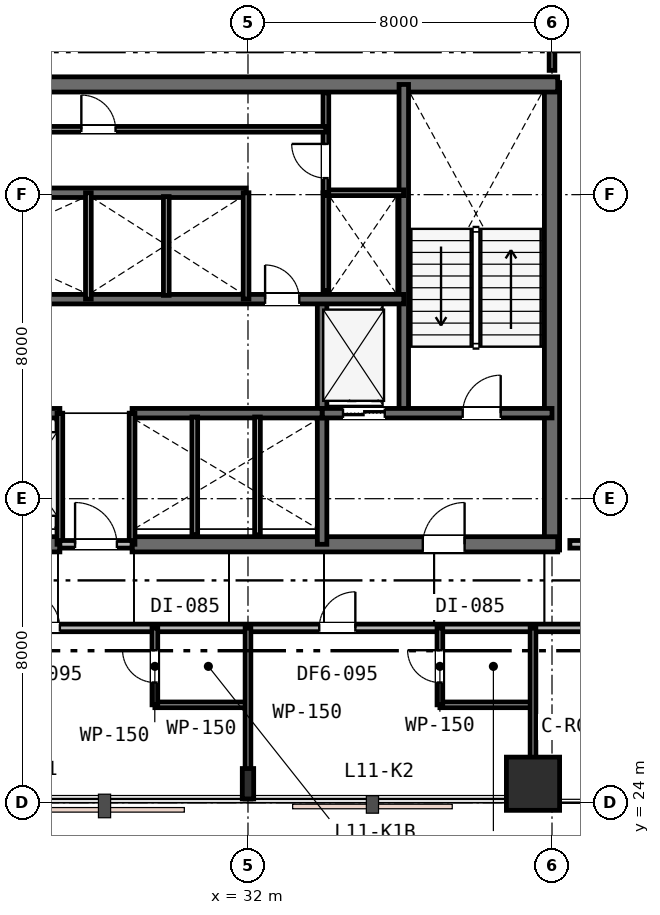
"""IFC4 building model, lengths in metres.
Left out: names, types, materials, properties, quantities, classifications, styles, units other than length and angle.
Written with IfcOpenShell. Run it as: python <this file> out.ifc"""

import sys

from ifc_helpers import new_model, si_unit, direction, frame, frame_2d, origin, origin_2d, place, context, subcontext, project, spatial, rectangle, i_section, extrude, element, fill, save


model = new_model("IFC4")
c1 = context("Model", 3, precision=1e-05, world=origin(), true_north=direction((0.0, 1.0)))
c2 = subcontext(c1, "Body", "Model", "MODEL_VIEW")
j1 = project(units=[si_unit("LENGTHUNIT", "METRE"), si_unit("PLANEANGLEUNIT", "RADIAN")], contexts=[c1])
p1 = place(None, origin())
s1 = spatial("IfcSite", under=j1, at=p1, CompositionType="ELEMENT")
p2 = place(p1, origin())
s2 = spatial("IfcBuilding", under=s1, at=p2, CompositionType="ELEMENT")
p3 = place(p2, frame((0.0, 0.0, 47.4)))
s3 = spatial("IfcBuildingStorey", under=s2, at=p3, CompositionType="ELEMENT", Elevation=47.4)
p4 = place(p3, frame((40.0, 30.65, 0.0), z_axis=(0.0, 0.0, 1.0), x_axis=(0.0, 1.0, 0.0)))
e1 = element("IfcWall", 1, at=p4, inside=s3, PredefinedType="SHEAR", context=c2, shape_type="SweptSolid", body=[
    extrude(rectangle(XDim=12.3, YDim=0.4, at=frame_2d((6.15, 0.0))), origin(), (0.0, 0.0, 1.0), 3.6),
])
p5 = place(p3, frame((15.85, 42.9, 0.0), z_axis=(0.0, 0.0, 1.0), x_axis=(1.0, 0.0, 0.0)))
e2 = element("IfcWall", 2, at=p5, inside=s3, PredefinedType="SHEAR", context=c2, shape_type="SweptSolid", body=[
    extrude(rectangle(XDim=24.3, YDim=0.4, at=frame_2d((12.15, 0.0))), origin(), (0.0, 0.0, 1.0), 3.6),
])
p6 = place(p3, frame((15.85, 30.8, 0.0), z_axis=(0.0, 0.0, 1.0), x_axis=(1.0, 0.0, 0.0)))
e3 = element("IfcWall", 3, at=p6, inside=s3, PredefinedType="SHEAR", context=c2, shape_type="SweptSolid", body=[
    extrude(rectangle(XDim=11.2, YDim=0.4, at=frame_2d((5.6, 0.0))), origin(), (0.0, 0.0, 1.0), 3.6),
])
p7 = place(p6, frame((2.45, 0.0, 0.0)))
e4 = element("IfcOpeningElement", 4, at=p7, cuts=e3, PredefinedType="OPENING", context=c2, shape_type="SweptSolid", body=[
    extrude(rectangle(XDim=1.1, YDim=2.15, at=frame_2d((0.55, 1.075))), frame((0.0, 0.21, 0.0), z_axis=(0.0, -1.0, 0.0), x_axis=(1.0, 0.0, 0.0)), (0.0, 0.0, 1.0), 0.42),
])
p8 = place(p3, frame((28.95, 30.8, 0.0), z_axis=(0.0, 0.0, 1.0), x_axis=(1.0, 0.0, 0.0)))
e5 = element("IfcWall", 5, at=p8, inside=s3, PredefinedType="SHEAR", context=c2, shape_type="SweptSolid", body=[
    extrude(rectangle(XDim=11.2, YDim=0.4, at=frame_2d((5.6, 0.0))), origin(), (0.0, 0.0, 1.0), 3.6),
])
p9 = place(p8, frame((7.65, 0.0, 0.0)))
e6 = element("IfcOpeningElement", 6, at=p9, cuts=e5, PredefinedType="OPENING", context=c2, shape_type="SweptSolid", body=[
    extrude(rectangle(XDim=1.1, YDim=2.15, at=frame_2d((0.55, 1.075))), frame((0.0, 0.21, 0.0), z_axis=(0.0, -1.0, 0.0), x_axis=(1.0, 0.0, 0.0)), (0.0, 0.0, 1.0), 0.42),
])
p10 = place(p3, frame((36.1, 34.25, 0.0), z_axis=(0.0, 0.0, 1.0), x_axis=(0.0, 1.0, 0.0)))
e7 = element("IfcWall", 7, at=p10, inside=s3, PredefinedType="SHEAR", context=c2, shape_type="SweptSolid", body=[
    extrude(rectangle(XDim=8.65, YDim=0.25, at=frame_2d((4.325, 0.0))), origin(), (0.0, 0.0, 1.0), 3.6),
])
p11 = place(p3, frame((33.95, 30.8, 0.0), z_axis=(0.0, 0.0, 1.0), x_axis=(0.0, 1.0, 0.0)))
e8 = element("IfcWall", 8, at=p11, inside=s3, PredefinedType="SHEAR", context=c2, shape_type="SweptSolid", body=[
    extrude(rectangle(XDim=6.45, YDim=0.25, at=frame_2d((3.225, 0.0))), origin(), (0.0, 0.0, 1.0), 3.6),
])
p12 = place(p3, frame((33.95, 34.25, 0.0), z_axis=(0.0, 0.0, 1.0), x_axis=(1.0, 0.0, 0.0)))
e9 = element("IfcWall", 9, at=p12, inside=s3, PredefinedType="SHEAR", context=c2, shape_type="SweptSolid", body=[
    extrude(rectangle(XDim=6.05, YDim=0.25, at=frame_2d((3.025, 0.0))), origin(), (0.0, 0.0, 1.0), 3.6),
])
p13 = place(p12, frame((3.7, 0.0, 0.0)))
e10 = element("IfcOpeningElement", 10, at=p13, cuts=e9, PredefinedType="OPENING", context=c2, shape_type="SweptSolid", body=[
    extrude(rectangle(XDim=1.0, YDim=2.15, at=frame_2d((0.5, 1.075))), frame((0.0, 0.135, 0.0), z_axis=(0.0, -1.0, 0.0), x_axis=(1.0, 0.0, 0.0)), (0.0, 0.0, 1.0), 0.27),
])
p14 = place(p12, frame((0.55, 0.0, 0.0)))
e11 = element("IfcOpeningElement", 11, at=p14, cuts=e9, PredefinedType="OPENING", context=c2, shape_type="SweptSolid", body=[
    extrude(rectangle(XDim=1.1, YDim=2.15, at=frame_2d((0.55, 1.075))), frame((0.0, 0.135, 0.0), z_axis=(0.0, -1.0, 0.0), x_axis=(1.0, 0.0, 0.0)), (0.0, 0.0, 1.0), 0.27),
])
p15 = place(p3, frame((22.05, 34.25, 0.0), z_axis=(0.0, 0.0, 1.0), x_axis=(1.0, 0.0, 0.0)))
e12 = element("IfcWall", 12, at=p15, inside=s3, PredefinedType="SHEAR", context=c2, shape_type="SweptSolid", body=[
    extrude(rectangle(XDim=5.0, YDim=0.25, at=frame_2d((2.5, 0.0))), origin(), (0.0, 0.0, 1.0), 3.6),
])
p16 = place(p15, frame((0.3, 0.0, 0.0)))
e13 = element("IfcOpeningElement", 13, at=p16, cuts=e12, PredefinedType="OPENING", context=c2, shape_type="SweptSolid", body=[
    extrude(rectangle(XDim=1.05, YDim=2.15, at=frame_2d((0.525, 1.075))), frame((0.0, 0.135, 0.0), z_axis=(0.0, -1.0, 0.0), x_axis=(1.0, 0.0, 0.0)), (0.0, 0.0, 1.0), 0.27),
])
p17 = place(p15, frame((1.95, 0.0, 0.0)))
e14 = element("IfcOpeningElement", 14, at=p17, cuts=e12, PredefinedType="OPENING", context=c2, shape_type="SweptSolid", body=[
    extrude(rectangle(XDim=1.05, YDim=2.15, at=frame_2d((0.525, 1.075))), frame((0.0, 0.135, 0.0), z_axis=(0.0, -1.0, 0.0), x_axis=(1.0, 0.0, 0.0)), (0.0, 0.0, 1.0), 0.27),
])
p18 = place(p15, frame((3.6, 0.0, 0.0)))
e15 = element("IfcOpeningElement", 15, at=p18, cuts=e12, PredefinedType="OPENING", context=c2, shape_type="SweptSolid", body=[
    extrude(rectangle(XDim=1.05, YDim=2.15, at=frame_2d((0.525, 1.075))), frame((0.0, 0.135, 0.0), z_axis=(0.0, -1.0, 0.0), x_axis=(1.0, 0.0, 0.0)), (0.0, 0.0, 1.0), 0.27),
])
p19 = place(p3, frame((28.95, 34.25, 0.0), z_axis=(0.0, 0.0, 1.0), x_axis=(1.0, 0.0, 0.0)))
e16 = element("IfcWall", 16, at=p19, inside=s3, PredefinedType="SHEAR", context=c2, shape_type="SweptSolid", body=[
    extrude(rectangle(XDim=5.0, YDim=0.25, at=frame_2d((2.5, 0.0))), origin(), (0.0, 0.0, 1.0), 3.6),
])
p20 = place(p3, frame((19.9, 37.25, 0.0), z_axis=(0.0, 0.0, 1.0), x_axis=(1.0, 0.0, 0.0)))
e17 = element("IfcWall", 17, at=p20, inside=s3, PredefinedType="SHEAR", context=c2, shape_type="SweptSolid", body=[
    extrude(rectangle(XDim=16.2, YDim=0.25, at=frame_2d((8.1, 0.0))), origin(), (0.0, 0.0, 1.0), 3.6),
])
p21 = place(p20, frame((12.55, 0.0, 0.0)))
e18 = element("IfcOpeningElement", 18, at=p21, cuts=e17, PredefinedType="OPENING", context=c2, shape_type="SweptSolid", body=[
    extrude(rectangle(XDim=0.9, YDim=2.15, at=frame_2d((0.45, 1.075))), frame((0.0, 0.135, 0.0), z_axis=(0.0, -1.0, 0.0), x_axis=(1.0, 0.0, 0.0)), (0.0, 0.0, 1.0), 0.27),
])
p22 = place(p3, frame((19.9, 40.05, 0.0), z_axis=(0.0, 0.0, 1.0), x_axis=(1.0, 0.0, 0.0)))
e19 = element("IfcWall", 19, at=p22, inside=s3, PredefinedType="SHEAR", context=c2, shape_type="SweptSolid", body=[
    extrude(rectangle(XDim=12.05, YDim=0.25, at=frame_2d((6.025, 0.0))), origin(), (0.0, 0.0, 1.0), 3.6),
])
p23 = place(p3, frame((32.0, 24.5, 0.0), z_axis=(0.0, 0.0, 1.0), x_axis=(1.0, 0.0, 0.0)))
e20 = element("IfcColumn", 20, at=p23, inside=s3, PredefinedType="COLUMN", context=c2, shape_type="SweptSolid", body=[
    extrude(i_section(OverallWidth=0.3, OverallDepth=0.8, WebThickness=0.018, FlangeThickness=0.033, FilletRadius=0.03, at=origin_2d()), origin(), (0.0, 0.0, 1.0), 3.6),
])
p24 = place(p3, frame((39.5, 24.5, 0.0), z_axis=(0.0, 0.0, 1.0), x_axis=(1.0, 0.0, 0.0)))
e21 = element("IfcColumn", 21, at=p24, inside=s3, PredefinedType="COLUMN", context=c2, shape_type="SweptSolid", body=[
    extrude(rectangle(XDim=1.4, YDim=1.4, at=origin_2d()), origin(), (0.0, 0.0, 1.0), 3.6),
])
for number, where, z_axis, x_axis in (
    (22, (27.05, 30.8, 0.0), (0.0, 0.0, 1.0), (0.0, 1.0, 0.0)),
    (23, (28.95, 30.8, 0.0), (0.0, 0.0, 1.0), (0.0, 1.0, 0.0)),
):
    element("IfcWall", number, at=place(p3, frame(where, z_axis=z_axis, x_axis=x_axis)), inside=s3, PredefinedType="PLUMBINGWALL", context=c2, shape_type="SweptSolid", body=[
        extrude(rectangle(XDim=3.45, YDim=0.15, at=frame_2d((1.725, 0.0))), origin(), (0.0, 0.0, 1.0), 3.33),
    ])
p25 = place(p3, frame((27.05, 30.8, 0.0), z_axis=(0.0, 0.0, 1.0), x_axis=(1.0, 0.0, 0.0)))
e24 = element("IfcWall", 24, at=p25, inside=s3, PredefinedType="PARTITIONING", context=c2, shape_type="SweptSolid", body=[
    extrude(rectangle(XDim=1.9, YDim=0.2, at=frame_2d((0.95, 0.0))), origin(), (0.0, 0.0, 1.0), 3.33),
])
p26 = place(p25, frame((0.4, 0.0, 0.0)))
e25 = element("IfcOpeningElement", 25, at=p26, cuts=e24, PredefinedType="OPENING", context=c2, shape_type="SweptSolid", body=[
    extrude(rectangle(XDim=1.1, YDim=2.15, at=frame_2d((0.55, 1.075))), frame((0.0, 0.11, 0.0), z_axis=(0.0, -1.0, 0.0), x_axis=(1.0, 0.0, 0.0)), (0.0, 0.0, 1.0), 0.22),
])
for number, where, z_axis, x_axis in (
    (26, (30.6, 31.05, 0.0), (0.0, 0.0, 1.0), (0.0, 1.0, 0.0)),
    (27, (32.25, 31.05, 0.0), (0.0, 0.0, 1.0), (0.0, 1.0, 0.0)),
):
    element("IfcWall", number, at=place(p3, frame(where, z_axis=z_axis, x_axis=x_axis)), inside=s3, PredefinedType="PLUMBINGWALL", context=c2, shape_type="SweptSolid", body=[
        extrude(rectangle(XDim=3.1, YDim=0.15, at=frame_2d((1.55, 0.0))), origin(), (0.0, 0.0, 1.0), 3.33),
    ])
for number, where, z_axis, x_axis in (
    (28, (27.8, 37.25, 0.0), (0.0, 0.0, 1.0), (0.0, 1.0, 0.0)),
    (29, (31.95, 37.25, 0.0), (0.0, 0.0, 1.0), (0.0, 1.0, 0.0)),
):
    element("IfcWall", number, at=place(p3, frame(where, z_axis=z_axis, x_axis=x_axis)), inside=s3, PredefinedType="PLUMBINGWALL", context=c2, shape_type="SweptSolid", body=[
        extrude(rectangle(XDim=2.8, YDim=0.15, at=frame_2d((1.4, 0.0))), origin(), (0.0, 0.0, 1.0), 3.33),
    ])
p27 = place(p3, frame((29.85, 37.35, 0.0), z_axis=(0.0, 0.0, 1.0), x_axis=(0.0, 1.0, 0.0)))
e30 = element("IfcWall", 30, at=p27, inside=s3, PredefinedType="PLUMBINGWALL", context=c2, shape_type="SweptSolid", body=[
    extrude(rectangle(XDim=2.6, YDim=0.15, at=frame_2d((1.3, 0.0))), origin(), (0.0, 0.0, 1.0), 3.33),
])
p28 = place(p3, frame((34.05, 37.473, 0.0), z_axis=(0.0, 0.0, 1.0), x_axis=(0.0, 1.0, 0.0)))
e31 = element("IfcWall", 31, at=p28, inside=s3, PredefinedType="PLUMBINGWALL", context=c2, shape_type="SweptSolid", body=[
    extrude(rectangle(XDim=2.577, YDim=0.15, at=frame_2d((1.288, 0.0))), origin(), (0.0, 0.0, 1.0), 3.33),
])
p29 = place(p3, frame((34.05, 40.05, 0.0), z_axis=(0.0, 0.0, 1.0), x_axis=(1.0, 0.0, 0.0)))
e32 = element("IfcWall", 32, at=p29, inside=s3, PredefinedType="PARTITIONING", context=c2, shape_type="SweptSolid", body=[
    extrude(rectangle(XDim=2.05, YDim=0.15, at=frame_2d((1.025, 0.0))), origin(), (0.0, 0.0, 1.0), 3.33),
])
p30 = place(p3, frame((34.05, 40.05, 0.0), z_axis=(0.0, 0.0, 1.0), x_axis=(0.0, 1.0, 0.0)))
e33 = element("IfcWall", 33, at=p30, inside=s3, PredefinedType="PARTITIONING", context=c2, shape_type="SweptSolid", body=[
    extrude(rectangle(XDim=2.63, YDim=0.15, at=frame_2d((1.315, 0.0))), origin(), (0.0, 0.0, 1.0), 3.33),
])
p31 = place(p30, frame((0.385, 0.0, 0.0)))
e34 = element("IfcOpeningElement", 34, at=p31, cuts=e33, PredefinedType="OPENING", context=c2, shape_type="SweptSolid", body=[
    extrude(rectangle(XDim=0.9, YDim=2.15, at=frame_2d((0.45, 1.075))), frame((0.0, 0.085, 0.0), z_axis=(0.0, -1.0, 0.0), x_axis=(1.0, 0.0, 0.0)), (0.0, 0.0, 1.0), 0.17),
])
p32 = place(p3, frame((22.08, 41.72, 0.0), z_axis=(0.0, 0.0, 1.0), x_axis=(1.0, 0.0, 0.0)))
e35 = element("IfcWall", 35, at=p32, inside=s3, PredefinedType="PARTITIONING", context=c2, shape_type="SweptSolid", body=[
    extrude(rectangle(XDim=11.97, YDim=0.15, at=frame_2d((5.985, 0.0))), origin(), (0.0, 0.0, 1.0), 3.33),
])
p33 = place(p32, frame((5.535, 0.0, 0.0)))
e36 = element("IfcOpeningElement", 36, at=p33, cuts=e35, PredefinedType="OPENING", context=c2, shape_type="SweptSolid", body=[
    extrude(rectangle(XDim=0.9, YDim=2.15, at=frame_2d((0.45, 1.075))), frame((0.0, 0.085, 0.0), z_axis=(0.0, -1.0, 0.0), x_axis=(1.0, 0.0, 0.0)), (0.0, 0.0, 1.0), 0.17),
])
p34 = place(p3, frame((21.8, 28.6, 0.0), z_axis=(0.0, 0.0, 1.0), x_axis=(1.0, 0.0, 0.0)))
e37 = element("IfcWall", 37, at=p34, inside=s3, PredefinedType="PARTITIONING", context=c2, shape_type="SweptSolid", body=[
    extrude(rectangle(XDim=28.6, YDim=0.2, at=frame_2d((14.3, 0.0))), origin(), (0.0, 0.0, 1.0), 2.82),
])
p35 = place(p34, frame((4.3, 0.0, 0.0)))
e38 = element("IfcOpeningElement", 38, at=p35, cuts=e37, PredefinedType="OPENING", context=c2, shape_type="SweptSolid", body=[
    extrude(rectangle(XDim=0.95, YDim=2.15, at=frame_2d((0.475, 1.075))), frame((0.0, 0.11, 0.0), z_axis=(0.0, -1.0, 0.0), x_axis=(1.0, 0.0, 0.0)), (0.0, 0.0, 1.0), 0.22),
])
p36 = place(p34, frame((12.075, 0.0, 0.0)))
e39 = element("IfcOpeningElement", 39, at=p36, cuts=e37, PredefinedType="OPENING", context=c2, shape_type="SweptSolid", body=[
    extrude(rectangle(XDim=0.95, YDim=2.15, at=frame_2d((0.475, 1.075))), frame((0.0, 0.11, 0.0), z_axis=(0.0, -1.0, 0.0), x_axis=(1.0, 0.0, 0.0)), (0.0, 0.0, 1.0), 0.22),
])
p37 = place(p34, frame((20.186, 0.0, 0.0)))
e40 = element("IfcOpeningElement", 40, at=p37, cuts=e37, PredefinedType="OPENING", context=c2, shape_type="SweptSolid", body=[
    extrude(rectangle(XDim=0.95, YDim=2.15, at=frame_2d((0.475, 1.075))), frame((0.0, 0.11, 0.0), z_axis=(0.0, -1.0, 0.0), x_axis=(1.0, 0.0, 0.0)), (0.0, 0.0, 1.0), 0.22),
])
p38 = place(p3, frame((40.0, 43.27, 0.0), z_axis=(0.0, 0.0, 1.0), x_axis=(0.0, 1.0, 0.0)))
e41 = element("IfcWall", 41, at=p38, inside=s3, PredefinedType="PARTITIONING", context=c2, shape_type="SweptSolid", body=[
    extrude(rectangle(XDim=4.63, YDim=0.15, at=frame_2d((2.315, 0.0))), origin(), (0.0, 0.0, 1.0), 2.93),
])
p39 = place(p3, frame((29.55, 26.576, 0.0), z_axis=(0.0, 0.0, 1.0), x_axis=(1.0, 0.0, 0.0)))
e42 = element("IfcWall", 42, at=p39, inside=s3, PredefinedType="PARTITIONING", context=c2, shape_type="SweptSolid", body=[
    extrude(rectangle(XDim=2.45, YDim=0.15, at=frame_2d((1.225, 0.0))), origin(), (0.0, 0.0, 1.0), 3.33),
])
p40 = place(p3, frame((29.55, 26.576, 0.0), z_axis=(0.0, 0.0, 1.0), x_axis=(0.0, 1.0, 0.0)))
e43 = element("IfcWall", 43, at=p40, inside=s3, PredefinedType="PARTITIONING", context=c2, shape_type="SweptSolid", body=[
    extrude(rectangle(XDim=2.024, YDim=0.15, at=frame_2d((1.012, 0.0))), origin(), (0.0, 0.0, 1.0), 3.33),
])
p41 = place(p40, frame((0.587, 0.0, 0.0)))
e44 = element("IfcOpeningElement", 44, at=p41, cuts=e43, PredefinedType="OPENING", context=c2, shape_type="SweptSolid", body=[
    extrude(rectangle(XDim=0.85, YDim=2.15, at=frame_2d((0.425, 1.075))), frame((0.0, 0.085, 0.0), z_axis=(0.0, -1.0, 0.0), x_axis=(1.0, 0.0, 0.0)), (0.0, 0.0, 1.0), 0.17),
])
p42 = place(p3, frame((32.0, 28.6, 0.0), z_axis=(0.0, 0.0, 1.0), x_axis=(0.0, -1.0, 0.0)))
e45 = element("IfcWall", 45, at=p42, inside=s3, PredefinedType="PARTITIONING", context=c2, shape_type="SweptSolid", body=[
    extrude(rectangle(XDim=4.5, YDim=0.15, at=frame_2d((2.25, 0.0))), origin(), (0.0, 0.0, 1.0), 2.93),
])
p43 = place(p3, frame((37.05, 26.576, 0.0), z_axis=(0.0, 0.0, 1.0), x_axis=(1.0, 0.0, 0.0)))
e46 = element("IfcWall", 46, at=p43, inside=s3, PredefinedType="PARTITIONING", context=c2, shape_type="SweptSolid", body=[
    extrude(rectangle(XDim=2.45, YDim=0.15, at=frame_2d((1.225, 0.0))), origin(), (0.0, 0.0, 1.0), 2.82),
])
p44 = place(p3, frame((37.05, 26.576, 0.0), z_axis=(0.0, 0.0, 1.0), x_axis=(0.0, 1.0, 0.0)))
e47 = element("IfcWall", 47, at=p44, inside=s3, PredefinedType="PARTITIONING", context=c2, shape_type="SweptSolid", body=[
    extrude(rectangle(XDim=2.024, YDim=0.15, at=frame_2d((1.012, 0.0))), origin(), (0.0, 0.0, 1.0), 2.96),
])
p45 = place(p44, frame((0.587, 0.0, 0.0)))
e48 = element("IfcOpeningElement", 48, at=p45, cuts=e47, PredefinedType="OPENING", context=c2, shape_type="SweptSolid", body=[
    extrude(rectangle(XDim=0.85, YDim=2.15, at=frame_2d((0.425, 1.075))), frame((0.0, 0.085, 0.0), z_axis=(0.0, -1.0, 0.0), x_axis=(1.0, 0.0, 0.0)), (0.0, 0.0, 1.0), 0.17),
])
p46 = place(p3, frame((39.5, 28.6, 0.0), z_axis=(0.0, 0.0, 1.0), x_axis=(0.0, -1.0, 0.0)))
e49 = element("IfcWall", 49, at=p46, inside=s3, PredefinedType="PARTITIONING", context=c2, shape_type="SweptSolid", body=[
    extrude(rectangle(XDim=4.5, YDim=0.15, at=frame_2d((2.25, 0.0))), origin(), (0.0, 0.0, 1.0), 2.82),
])
p47 = place(p3, frame((40.47, 30.8, 0.0), z_axis=(0.0, 0.0, 1.0), x_axis=(1.0, 0.0, 0.0)))
e50 = element("IfcWall", 50, at=p47, inside=s3, PredefinedType="PARTITIONING", context=c2, shape_type="SweptSolid", body=[
    extrude(rectangle(XDim=15.43, YDim=0.2, at=frame_2d((7.715, 0.0))), origin(), (0.0, 0.0, 1.0), 2.82),
])
p48 = place(p47, frame((6.673, 0.0, 0.0)))
e51 = element("IfcOpeningElement", 51, at=p48, cuts=e50, PredefinedType="OPENING", context=c2, shape_type="SweptSolid", body=[
    extrude(rectangle(XDim=0.95, YDim=2.15, at=frame_2d((0.475, 1.075))), frame((0.0, 0.11, 0.0), z_axis=(0.0, -1.0, 0.0), x_axis=(1.0, 0.0, 0.0)), (0.0, 0.0, 1.0), 0.22),
])
p49 = place(p26, origin())
e52 = element("IfcDoor", 52, at=p49, inside=s3, OperationType="SINGLE_SWING_LEFT", PredefinedType="DOOR", context=c2, shape_type="SweptSolid", body=[
    extrude(rectangle(XDim=1.1, YDim=2.15, at=frame_2d((0.55, 1.075))), frame((0.0, 0.025, 0.0), z_axis=(0.0, -1.0, 0.0), x_axis=(1.0, 0.0, 0.0)), (0.0, 0.0, 1.0), 0.05),
])
fill(e25, e52)
p50 = place(p13, origin())
e53 = element("IfcDoor", 53, at=p50, inside=s3, OperationType="SINGLE_SWING_RIGHT", PredefinedType="DOOR", context=c2, shape_type="SweptSolid", body=[
    extrude(rectangle(XDim=1.0, YDim=2.15, at=frame_2d((0.5, 1.075))), frame((0.0, 0.025, 0.0), z_axis=(0.0, -1.0, 0.0), x_axis=(1.0, 0.0, 0.0)), (0.0, 0.0, 1.0), 0.05),
])
fill(e10, e53)
p51 = place(p9, origin())
e54 = element("IfcDoor", 54, at=p51, inside=s3, OperationType="SINGLE_SWING_RIGHT", PredefinedType="DOOR", context=c2, shape_type="SweptSolid", body=[
    extrude(rectangle(XDim=1.1, YDim=2.15, at=frame_2d((0.55, 1.075))), frame((0.0, 0.025, 0.0), z_axis=(0.0, -1.0, 0.0), x_axis=(1.0, 0.0, 0.0)), (0.0, 0.0, 1.0), 0.05),
])
fill(e6, e54)
p52 = place(p21, origin())
e55 = element("IfcDoor", 55, at=p52, inside=s3, OperationType="SINGLE_SWING_LEFT", PredefinedType="DOOR", context=c2, shape_type="SweptSolid", body=[
    extrude(rectangle(XDim=0.9, YDim=2.15, at=frame_2d((0.45, 1.075))), frame((0.0, 0.025, 0.0), z_axis=(0.0, -1.0, 0.0), x_axis=(1.0, 0.0, 0.0)), (0.0, 0.0, 1.0), 0.05),
])
fill(e18, e55)
p53 = place(p31, origin())
e56 = element("IfcDoor", 56, at=p53, inside=s3, OperationType="SINGLE_SWING_RIGHT", PredefinedType="DOOR", context=c2, shape_type="SweptSolid", body=[
    extrude(rectangle(XDim=0.9, YDim=2.15, at=frame_2d((0.45, 1.075))), frame((0.0, 0.025, 0.0), z_axis=(0.0, -1.0, 0.0), x_axis=(1.0, 0.0, 0.0)), (0.0, 0.0, 1.0), 0.05),
])
fill(e34, e56)
p54 = place(p33, origin())
e57 = element("IfcDoor", 57, at=p54, inside=s3, OperationType="SINGLE_SWING_LEFT", PredefinedType="DOOR", context=c2, shape_type="SweptSolid", body=[
    extrude(rectangle(XDim=0.9, YDim=2.15, at=frame_2d((0.45, 1.075))), frame((0.0, 0.025, 0.0), z_axis=(0.0, -1.0, 0.0), x_axis=(1.0, 0.0, 0.0)), (0.0, 0.0, 1.0), 0.05),
])
fill(e36, e57)
p55 = place(p35, origin())
e58 = element("IfcDoor", 58, at=p55, inside=s3, OperationType="SINGLE_SWING_LEFT", PredefinedType="DOOR", context=c2, shape_type="SweptSolid", body=[
    extrude(rectangle(XDim=0.95, YDim=2.15, at=frame_2d((0.475, 1.075))), frame((0.0, 0.025, 0.0), z_axis=(0.0, -1.0, 0.0), x_axis=(1.0, 0.0, 0.0)), (0.0, 0.0, 1.0), 0.05),
])
fill(e38, e58)
p56 = place(p41, origin())
e59 = element("IfcDoor", 59, at=p56, inside=s3, OperationType="SINGLE_SWING_RIGHT", PredefinedType="DOOR", context=c2, shape_type="SweptSolid", body=[
    extrude(rectangle(XDim=0.85, YDim=2.15, at=frame_2d((0.425, 1.075))), frame((0.0, 0.025, 0.0), z_axis=(0.0, -1.0, 0.0), x_axis=(1.0, 0.0, 0.0)), (0.0, 0.0, 1.0), 0.05),
])
fill(e44, e59)
p57 = place(p36, origin())
e60 = element("IfcDoor", 60, at=p57, inside=s3, OperationType="SINGLE_SWING_RIGHT", PredefinedType="DOOR", context=c2, shape_type="SweptSolid", body=[
    extrude(rectangle(XDim=0.95, YDim=2.15, at=frame_2d((0.475, 1.075))), frame((0.0, 0.025, 0.0), z_axis=(0.0, -1.0, 0.0), x_axis=(1.0, 0.0, 0.0)), (0.0, 0.0, 1.0), 0.05),
])
fill(e39, e60)
p58 = place(p45, origin())
e61 = element("IfcDoor", 61, at=p58, inside=s3, OperationType="SINGLE_SWING_RIGHT", PredefinedType="DOOR", context=c2, shape_type="SweptSolid", body=[
    extrude(rectangle(XDim=0.85, YDim=2.15, at=frame_2d((0.425, 1.075))), frame((0.0, 0.025, 0.0), z_axis=(0.0, -1.0, 0.0), x_axis=(1.0, 0.0, 0.0)), (0.0, 0.0, 1.0), 0.05),
])
fill(e48, e61)
p59 = place(p14, origin())
e62 = element("IfcDoor", 62, at=p59, inside=s3, OperationType="DOUBLE_DOOR_SLIDING", PredefinedType="DOOR", context=c2, shape_type="SweptSolid", body=[
    extrude(rectangle(XDim=1.1, YDim=2.15, at=frame_2d((0.55, 1.075))), frame((0.0, 0.025, 0.0), z_axis=(0.0, -1.0, 0.0), x_axis=(1.0, 0.0, 0.0)), (0.0, 0.0, 1.0), 0.05),
])
fill(e11, e62)
save(model, sys.argv[1])
